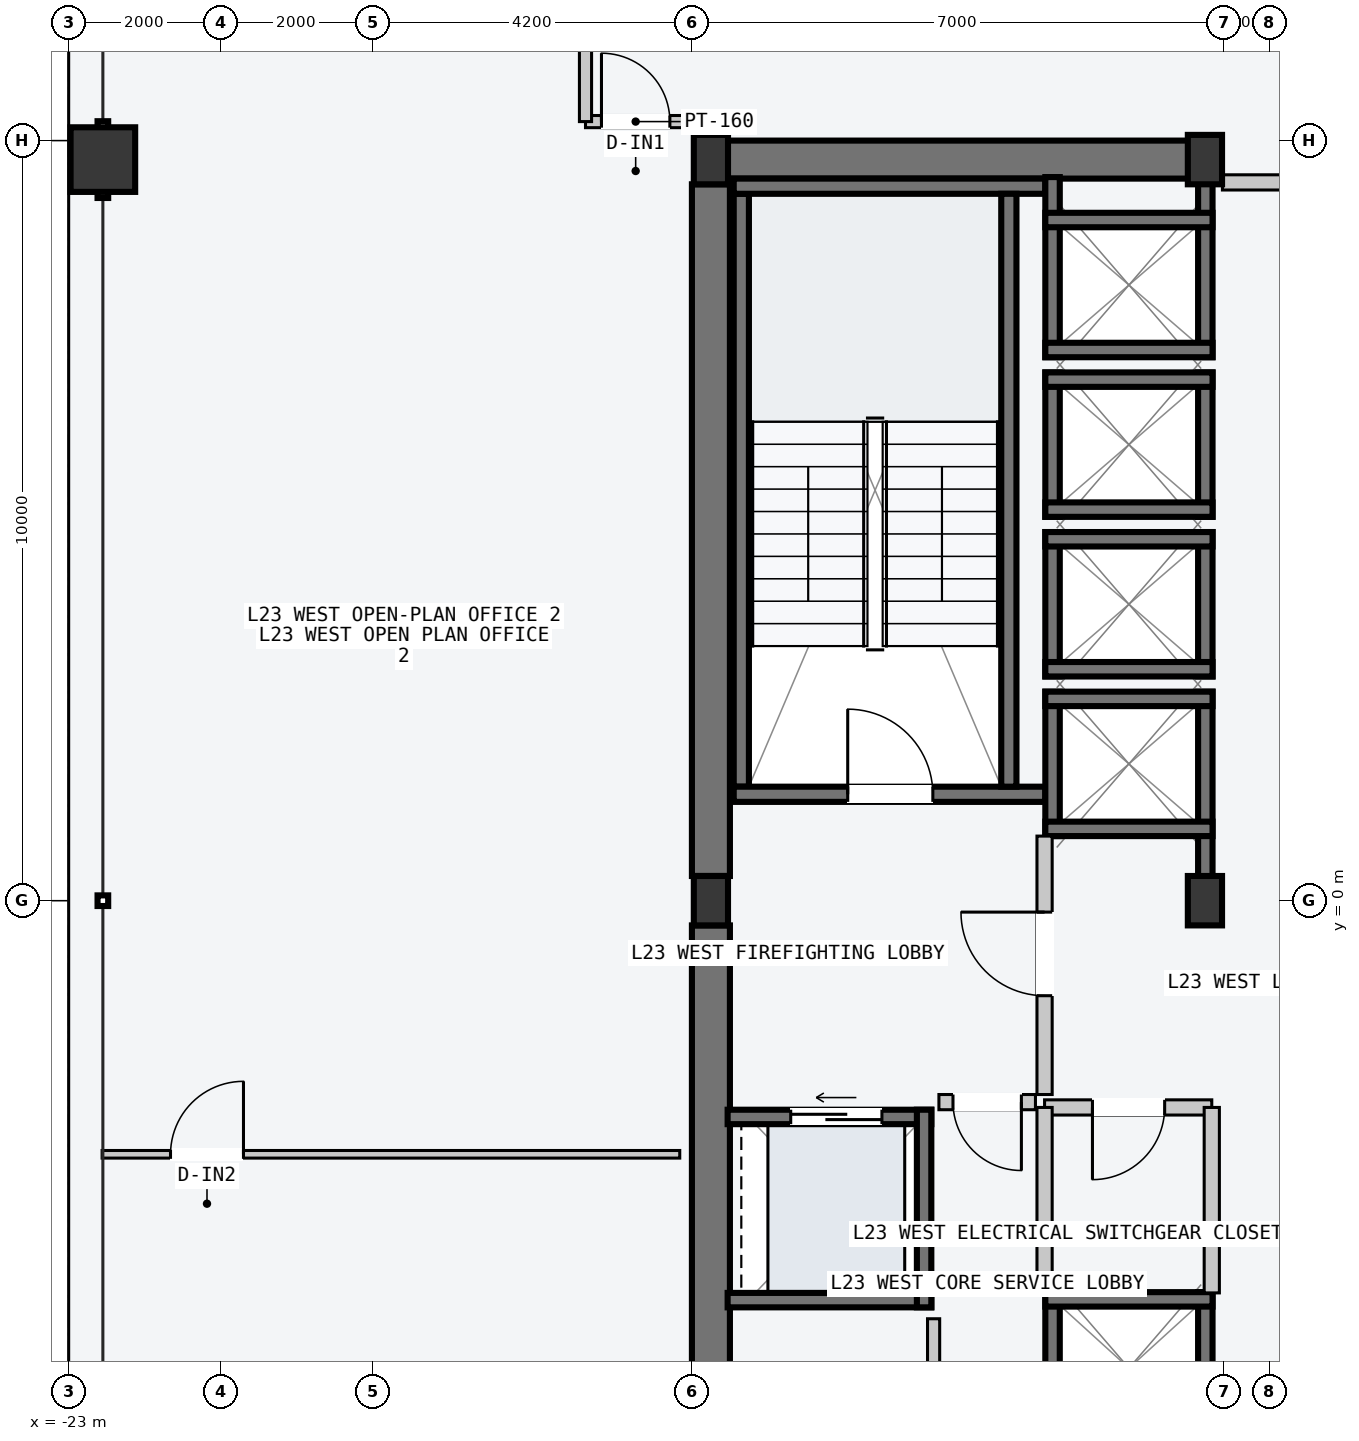
"""IFC4 building model, lengths in metres.
Left out: names, types, materials, properties, quantities, classifications, styles, units other than length and angle.
Written with IfcOpenShell. Run it as: python <this file> out.ifc"""

import sys

from ifc_helpers import new_model, si_unit, direction, frame, frame_2d, origin, origin_2d, place, context, subcontext, project, spatial, rectangle, hollow_rectangle, i_section, extrude, element, fill, save


model = new_model("IFC4")
c1 = context("Model", 3, precision=1e-05, world=origin(), true_north=direction((0.0, 1.0)))
c2 = subcontext(c1, "Body", "Model", "MODEL_VIEW")
j1 = project(units=[si_unit("LENGTHUNIT", "METRE"), si_unit("PLANEANGLEUNIT", "RADIAN")], contexts=[c1])
p1 = place(None, origin())
s1 = spatial("IfcSite", under=j1, at=p1, CompositionType="ELEMENT")
p2 = place(p1, origin())
s2 = spatial("IfcBuilding", under=s1, at=p2, CompositionType="ELEMENT")
p3 = place(p2, frame((0.0, 0.0, 91.8)))
s3 = spatial("IfcBuildingStorey", under=s2, at=p3, CompositionType="ELEMENT", Elevation=91.8)
p4 = place(p3, frame((-14.53, 9.75, -0.2), z_axis=(0.0, 0.0, 1.0), x_axis=(1.0, 0.0, 0.0)))
e1 = element("IfcWall", 1, at=p4, inside=s3, PredefinedType="SHEAR", context=c2, shape_type="SweptSolid", body=[
    extrude(rectangle(XDim=6.46, YDim=0.5, at=frame_2d((3.23, 0.0))), origin(), (0.0, 0.0, 1.0), 3.6),
])
for number, where, z_axis, x_axis in (
    (2, (-14.55, -9.425, -0.2), (0.0, 0.0, 1.0), (0.0, 1.0, 0.0)),
    (3, (-14.55, 0.325, -0.2), (0.0, 0.0, 1.0), (0.0, 1.0, 0.0)),
):
    element("IfcWall", number, at=place(p3, frame(where, z_axis=z_axis, x_axis=x_axis)), inside=s3, PredefinedType="SHEAR", context=c2, shape_type="SweptSolid", body=[
        extrude(rectangle(XDim=9.1, YDim=0.5, at=frame_2d((4.55, 0.0))), origin(), (0.0, 0.0, 1.0), 3.6),
    ])
p5 = place(p3, frame((-14.15, 1.5, -0.2), z_axis=(0.0, 0.0, 1.0), x_axis=(0.0, 1.0, 0.0)))
e4 = element("IfcWall", 4, at=p5, inside=s3, PredefinedType="SOLIDWALL", context=c2, shape_type="SweptSolid", body=[
    extrude(rectangle(XDim=7.8, YDim=0.2, at=frame_2d((3.9, 0.0))), origin(), (0.0, 0.0, 1.0), 3.6),
])
p6 = place(p3, frame((-14.25, 1.4, -0.2), z_axis=(0.0, 0.0, 1.0), x_axis=(1.0, 0.0, 0.0)))
e5 = element("IfcWall", 5, at=p6, inside=s3, PredefinedType="SOLIDWALL", context=c2, shape_type="SweptSolid", body=[
    extrude(rectangle(XDim=4.1, YDim=0.2, at=frame_2d((2.05, 0.0))), origin(), (0.0, 0.0, 1.0), 3.6),
])
p7 = place(p6, frame((1.5, 0.0, 0.2)))
e6 = element("IfcOpeningElement", 6, at=p7, cuts=e5, PredefinedType="OPENING", context=c2, shape_type="SweptSolid", body=[
    extrude(rectangle(XDim=1.12, YDim=2.18, at=frame_2d((0.56, 1.09))), frame((0.0, 0.11, 0.0), z_axis=(0.0, -1.0, 0.0), x_axis=(1.0, 0.0, 0.0)), (0.0, 0.0, 1.0), 0.22),
])
p8 = place(p3, frame((-14.25, 9.4, -0.2), z_axis=(0.0, 0.0, 1.0), x_axis=(1.0, 0.0, 0.0)))
e7 = element("IfcWall", 7, at=p8, inside=s3, PredefinedType="SOLIDWALL", context=c2, shape_type="SweptSolid", body=[
    extrude(rectangle(XDim=4.1, YDim=0.2, at=frame_2d((2.05, 0.0))), origin(), (0.0, 0.0, 1.0), 3.6),
])
p9 = place(p3, frame((-10.63, 1.5, -0.2), z_axis=(0.0, 0.0, 1.0), x_axis=(0.0, 1.0, 0.0)))
e8 = element("IfcWall", 8, at=p9, inside=s3, PredefinedType="SOLIDWALL", context=c2, shape_type="SweptSolid", body=[
    extrude(rectangle(XDim=7.8, YDim=0.2, at=frame_2d((3.9, 0.0))), origin(), (0.0, 0.0, 1.0), 3.6),
])
for number, where, z_axis, x_axis in (
    (9, (-14.55, 0.0, 0.0), (0.0, 0.0, 1.0), (1.0, 0.0, 0.0)),
    (10, (-14.55, 9.75, 0.0), (0.0, 0.0, 1.0), (1.0, 0.0, 0.0)),
    (11, (-8.05, 0.0, 0.0), (0.0, 0.0, 1.0), (1.0, 0.0, 0.0)),
    (12, (-8.05, 9.75, 0.0), (0.0, 0.0, 1.0), (1.0, 0.0, 0.0)),
):
    element("IfcColumn", number, at=place(p3, frame(where, z_axis=z_axis, x_axis=x_axis)), inside=s3, PredefinedType="COLUMN", context=c2, shape_type="SweptSolid", body=[
        extrude(i_section(OverallWidth=0.45, OverallDepth=0.65, WebThickness=0.025, FlangeThickness=0.04, at=origin_2d()), origin(), (0.0, 0.0, 1.0), 3.6),
    ])
p10 = place(p3, frame((-22.55, 9.75, 0.0), z_axis=(0.0, 0.0, 1.0), x_axis=(0.0, 1.0, 0.0)))
e13 = element("IfcColumn", 13, at=p10, inside=s3, PredefinedType="COLUMN", context=c2, shape_type="SweptSolid", body=[
    extrude(hollow_rectangle(XDim=0.85, YDim=0.85, WallThickness=0.04, at=origin_2d()), origin(), (0.0, 0.0, 1.0), 3.6),
])
p11 = place(p3, frame((-8.045, 0.21, -0.2), z_axis=(0.0, 0.0, 1.0), x_axis=(0.0, 1.0, 0.0)))
e14 = element("IfcWall", 14, at=p11, inside=s3, PredefinedType="SOLIDWALL", context=c2, shape_type="SweptSolid", body=[
    extrude(rectangle(XDim=2.54, YDim=0.19, at=frame_2d((1.27, 0.0))), origin(), (0.0, 0.0, 1.0), 3.6),
])
p12 = place(p3, frame((-10.055, 0.85, -0.2), z_axis=(0.0, 0.0, 1.0), x_axis=(0.0, 1.0, 0.0)))
e15 = element("IfcWall", 15, at=p12, inside=s3, PredefinedType="SOLIDWALL", context=c2, shape_type="SweptSolid", body=[
    extrude(rectangle(XDim=1.9, YDim=0.19, at=frame_2d((0.95, 0.0))), origin(), (0.0, 0.0, 1.0), 3.6),
])
for number, where, z_axis, x_axis in (
    (16, (-10.15, 2.655, -0.2), (0.0, 0.0, 1.0), (1.0, 0.0, 0.0)),
    (17, (-10.15, 0.945, -0.2), (0.0, 0.0, 1.0), (1.0, 0.0, 0.0)),
):
    element("IfcWall", number, at=place(p3, frame(where, z_axis=z_axis, x_axis=x_axis)), inside=s3, PredefinedType="SOLIDWALL", context=c2, shape_type="SweptSolid", body=[
        extrude(rectangle(XDim=2.2, YDim=0.19, at=frame_2d((1.1, 0.0))), origin(), (0.0, 0.0, 1.0), 3.6),
    ])
for number, where, z_axis, x_axis in (
    (18, (-8.045, 2.95, -0.2), (0.0, 0.0, 1.0), (0.0, 1.0, 0.0)),
    (19, (-10.055, 2.95, -0.2), (0.0, 0.0, 1.0), (0.0, 1.0, 0.0)),
):
    element("IfcWall", number, at=place(p3, frame(where, z_axis=z_axis, x_axis=x_axis)), inside=s3, PredefinedType="SOLIDWALL", context=c2, shape_type="SweptSolid", body=[
        extrude(rectangle(XDim=1.9, YDim=0.19, at=frame_2d((0.95, 0.0))), origin(), (0.0, 0.0, 1.0), 3.6),
    ])
for number, where, z_axis, x_axis in (
    (20, (-10.15, 4.755, -0.2), (0.0, 0.0, 1.0), (1.0, 0.0, 0.0)),
    (21, (-10.15, 3.045, -0.2), (0.0, 0.0, 1.0), (1.0, 0.0, 0.0)),
):
    element("IfcWall", number, at=place(p3, frame(where, z_axis=z_axis, x_axis=x_axis)), inside=s3, PredefinedType="SOLIDWALL", context=c2, shape_type="SweptSolid", body=[
        extrude(rectangle(XDim=2.2, YDim=0.19, at=frame_2d((1.1, 0.0))), origin(), (0.0, 0.0, 1.0), 3.6),
    ])
for number, where, z_axis, x_axis in (
    (22, (-8.045, 5.05, -0.2), (0.0, 0.0, 1.0), (0.0, 1.0, 0.0)),
    (23, (-10.055, 5.05, -0.2), (0.0, 0.0, 1.0), (0.0, 1.0, 0.0)),
):
    element("IfcWall", number, at=place(p3, frame(where, z_axis=z_axis, x_axis=x_axis)), inside=s3, PredefinedType="SOLIDWALL", context=c2, shape_type="SweptSolid", body=[
        extrude(rectangle(XDim=1.9, YDim=0.19, at=frame_2d((0.95, 0.0))), origin(), (0.0, 0.0, 1.0), 3.6),
    ])
for number, where, z_axis, x_axis in (
    (24, (-10.15, 6.855, -0.2), (0.0, 0.0, 1.0), (1.0, 0.0, 0.0)),
    (25, (-10.15, 5.145, -0.2), (0.0, 0.0, 1.0), (1.0, 0.0, 0.0)),
):
    element("IfcWall", number, at=place(p3, frame(where, z_axis=z_axis, x_axis=x_axis)), inside=s3, PredefinedType="SOLIDWALL", context=c2, shape_type="SweptSolid", body=[
        extrude(rectangle(XDim=2.2, YDim=0.19, at=frame_2d((1.1, 0.0))), origin(), (0.0, 0.0, 1.0), 3.6),
    ])
for number, where, z_axis, x_axis in (
    (26, (-8.045, 7.15, -0.2), (0.0, 0.0, 1.0), (0.0, 1.0, 0.0)),
    (27, (-10.055, 7.15, -0.2), (0.0, 0.0, 1.0), (0.0, 1.0, 0.0)),
):
    element("IfcWall", number, at=place(p3, frame(where, z_axis=z_axis, x_axis=x_axis)), inside=s3, PredefinedType="SOLIDWALL", context=c2, shape_type="SweptSolid", body=[
        extrude(rectangle(XDim=2.37, YDim=0.19, at=frame_2d((1.185, 0.0))), origin(), (0.0, 0.0, 1.0), 3.6),
    ])
for number, where, z_axis, x_axis in (
    (28, (-10.15, 8.955, -0.2), (0.0, 0.0, 1.0), (1.0, 0.0, 0.0)),
    (29, (-10.15, 7.245, -0.2), (0.0, 0.0, 1.0), (1.0, 0.0, 0.0)),
):
    element("IfcWall", number, at=place(p3, frame(where, z_axis=z_axis, x_axis=x_axis)), inside=s3, PredefinedType="SOLIDWALL", context=c2, shape_type="SweptSolid", body=[
        extrude(rectangle(XDim=2.2, YDim=0.19, at=frame_2d((1.1, 0.0))), origin(), (0.0, 0.0, 1.0), 3.6),
    ])
for number, where, z_axis, x_axis in (
    (30, (-8.045, -7.15, -0.2), (0.0, 0.0, 1.0), (0.0, 1.0, 0.0)),
    (31, (-10.055, -7.15, -0.2), (0.0, 0.0, 1.0), (0.0, 1.0, 0.0)),
):
    element("IfcWall", number, at=place(p3, frame(where, z_axis=z_axis, x_axis=x_axis)), inside=s3, PredefinedType="SOLIDWALL", context=c2, shape_type="SweptSolid", body=[
        extrude(rectangle(XDim=2.0, YDim=0.19, at=frame_2d((1.0, 0.0))), origin(), (0.0, 0.0, 1.0), 3.6),
    ])
p13 = place(p3, frame((-10.15, -5.245, -0.2), z_axis=(0.0, 0.0, 1.0), x_axis=(1.0, 0.0, 0.0)))
e32 = element("IfcWall", 32, at=p13, inside=s3, PredefinedType="SOLIDWALL", context=c2, shape_type="SweptSolid", body=[
    extrude(rectangle(XDim=2.2, YDim=0.19, at=frame_2d((1.1, 0.0))), origin(), (0.0, 0.0, 1.0), 3.6),
])
p14 = place(p3, frame((-14.33, -2.845, -0.2), z_axis=(0.0, 0.0, 1.0), x_axis=(1.0, 0.0, 0.0)))
e33 = element("IfcWall", 33, at=p14, inside=s3, PredefinedType="SOLIDWALL", context=c2, shape_type="SweptSolid", body=[
    extrude(rectangle(XDim=2.68, YDim=0.19, at=frame_2d((1.34, 0.0))), origin(), (0.0, 0.0, 1.0), 3.6),
])
p15 = place(p14, frame((0.83, 0.0, 0.2)))
e34 = element("IfcOpeningElement", 34, at=p15, cuts=e33, PredefinedType="OPENING", context=c2, shape_type="SweptSolid", body=[
    extrude(rectangle(XDim=1.2, YDim=2.2, at=frame_2d((0.6, 1.1))), frame((0.0, 0.105, 0.0), z_axis=(0.0, -1.0, 0.0), x_axis=(1.0, 0.0, 0.0)), (0.0, 0.0, 1.0), 0.21),
])
p16 = place(p3, frame((-14.33, -5.255, -0.2), z_axis=(0.0, 0.0, 1.0), x_axis=(1.0, 0.0, 0.0)))
e35 = element("IfcWall", 35, at=p16, inside=s3, PredefinedType="SOLIDWALL", context=c2, shape_type="SweptSolid", body=[
    extrude(rectangle(XDim=2.68, YDim=0.19, at=frame_2d((1.34, 0.0))), origin(), (0.0, 0.0, 1.0), 3.6),
])
p17 = place(p3, frame((-11.745, -5.35, -0.2), z_axis=(0.0, 0.0, 1.0), x_axis=(0.0, 1.0, 0.0)))
e36 = element("IfcWall", 36, at=p17, inside=s3, PredefinedType="SOLIDWALL", context=c2, shape_type="SweptSolid", body=[
    extrude(rectangle(XDim=2.6, YDim=0.19, at=frame_2d((1.3, 0.0))), origin(), (0.0, 0.0, 1.0), 3.6),
])
p18 = place(p3, frame((-6.02, 9.45, 0.0), z_axis=(0.0, 0.0, 1.0), x_axis=(-1.0, 0.0, 0.0)))
e37 = element("IfcWall", 37, at=p18, inside=s3, PredefinedType="PARTITIONING", context=c2, shape_type="SweptSolid", body=[
    extrude(rectangle(XDim=1.8, YDim=0.2, at=frame_2d((0.9, 0.0))), origin(), (0.0, 0.0, 1.0), 3.4),
])
p19 = place(p3, frame((-10.16, -2.55, 0.0), z_axis=(0.0, 0.0, 1.0), x_axis=(0.0, 1.0, 0.0)))
e38 = element("IfcWall", 38, at=p19, inside=s3, PredefinedType="PARTITIONING", context=c2, shape_type="SweptSolid", body=[
    extrude(rectangle(XDim=3.4, YDim=0.2, at=frame_2d((1.7, 0.0))), origin(), (0.0, 0.0, 1.0), 3.4),
])
p20 = place(p19, frame((1.3, 0.0, 0.0)))
e39 = element("IfcOpeningElement", 39, at=p20, cuts=e38, PredefinedType="OPENING", context=c2, shape_type="SweptSolid", body=[
    extrude(rectangle(XDim=1.1, YDim=2.15, at=frame_2d((0.55, 1.075))), frame((0.0, 0.11, 0.0), z_axis=(0.0, -1.0, 0.0), x_axis=(1.0, 0.0, 0.0)), (0.0, 0.0, 1.0), 0.22),
])
p21 = place(p3, frame((-10.28, -2.65, 0.0), z_axis=(0.0, 0.0, 1.0), x_axis=(-1.0, 0.0, 0.0)))
e40 = element("IfcWall", 40, at=p21, inside=s3, PredefinedType="PARTITIONING", context=c2, shape_type="SweptSolid", body=[
    extrude(rectangle(XDim=1.27, YDim=0.2, at=frame_2d((0.635, 0.0))), origin(), (0.0, 0.0, 1.0), 3.4),
])
p22 = place(p21, frame((0.185, 0.0, 0.0)))
e41 = element("IfcOpeningElement", 41, at=p22, cuts=e40, PredefinedType="OPENING", context=c2, shape_type="SweptSolid", body=[
    extrude(rectangle(XDim=0.9, YDim=2.15, at=frame_2d((0.45, 1.075))), frame((0.0, 0.11, 0.0), z_axis=(0.0, -1.0, 0.0), x_axis=(1.0, 0.0, 0.0)), (0.0, 0.0, 1.0), 0.22),
])
p23 = place(p3, frame((-7.96, -2.72, 0.0), z_axis=(0.0, 0.0, 1.0), x_axis=(-1.0, 0.0, 0.0)))
e42 = element("IfcWall", 42, at=p23, inside=s3, PredefinedType="PARTITIONING", context=c2, shape_type="SweptSolid", body=[
    extrude(rectangle(XDim=2.2, YDim=0.2, at=frame_2d((1.1, 0.0))), origin(), (0.0, 0.0, 1.0), 3.4),
])
p24 = place(p23, frame((0.62, 0.0, 0.0)))
e43 = element("IfcOpeningElement", 43, at=p24, cuts=e42, PredefinedType="OPENING", context=c2, shape_type="SweptSolid", body=[
    extrude(rectangle(XDim=0.95, YDim=2.1, at=frame_2d((0.475, 1.05))), frame((0.0, 0.11, 0.0), z_axis=(0.0, -1.0, 0.0), x_axis=(1.0, 0.0, 0.0)), (0.0, 0.0, 1.0), 0.22),
])
for number, where, z_axis, x_axis in (
    (44, (-7.96, -5.16, 0.0), (0.0, 0.0, 1.0), (0.0, 1.0, 0.0)),
    (45, (-10.16, -5.16, 0.0), (0.0, 0.0, 1.0), (0.0, 1.0, 0.0)),
):
    element("IfcWall", number, at=place(p3, frame(where, z_axis=z_axis, x_axis=x_axis)), inside=s3, PredefinedType="PARTITIONING", context=c2, shape_type="SweptSolid", body=[
        extrude(rectangle(XDim=2.44, YDim=0.2, at=frame_2d((1.22, 0.0))), origin(), (0.0, 0.0, 1.0), 3.4),
    ])
p25 = place(p3, frame((-11.62, -9.35, 0.0), z_axis=(0.0, 0.0, 1.0), x_axis=(0.0, 1.0, 0.0)))
e46 = element("IfcWall", 46, at=p25, inside=s3, PredefinedType="PARTITIONING", context=c2, shape_type="SweptSolid", body=[
    extrude(rectangle(XDim=3.85, YDim=0.16, at=frame_2d((1.925, 0.0))), origin(), (0.0, 0.0, 1.0), 3.4),
])
p26 = place(p25, frame((1.475, 0.0, 0.0)))
e47 = element("IfcOpeningElement", 47, at=p26, cuts=e46, PredefinedType="OPENING", context=c2, shape_type="SweptSolid", body=[
    extrude(rectangle(XDim=0.9, YDim=2.15, at=frame_2d((0.45, 1.075))), frame((0.0, 0.09, 0.0), z_axis=(0.0, -1.0, 0.0), x_axis=(1.0, 0.0, 0.0)), (0.0, 0.0, 1.0), 0.18),
])
p27 = place(p3, frame((-16.2, 10.25, 0.0), z_axis=(0.0, 0.0, 1.0), x_axis=(1.0, 0.0, 0.0)))
e48 = element("IfcWall", 48, at=p27, inside=s3, PredefinedType="PARTITIONING", context=c2, shape_type="SweptSolid", body=[
    extrude(rectangle(XDim=1.32, YDim=0.16, at=frame_2d((0.66, 0.0))), origin(), (0.0, 0.0, 1.0), 3.4),
])
p28 = place(p27, frame((0.21, 0.0, 0.0)))
e49 = element("IfcOpeningElement", 49, at=p28, cuts=e48, PredefinedType="OPENING", context=c2, shape_type="SweptSolid", body=[
    extrude(rectangle(XDim=0.9, YDim=2.15, at=frame_2d((0.45, 1.075))), frame((0.0, 0.09, 0.0), z_axis=(0.0, -1.0, 0.0), x_axis=(1.0, 0.0, 0.0)), (0.0, 0.0, 1.0), 0.18),
])
p29 = place(p3, frame((-16.2, 10.25, 0.0), z_axis=(0.0, 0.0, 1.0), x_axis=(0.0, 1.0, 0.0)))
e50 = element("IfcWall", 50, at=p29, inside=s3, PredefinedType="PARTITIONING", context=c2, shape_type="SweptSolid", body=[
    extrude(rectangle(XDim=1.95, YDim=0.16, at=frame_2d((0.975, 0.0))), origin(), (0.0, 0.0, 1.0), 3.4),
])
p30 = place(p3, frame((-22.56, -3.336, 0.0), z_axis=(0.0, 0.0, 1.0), x_axis=(1.0, 0.0, 0.0)))
e51 = element("IfcWall", 51, at=p30, inside=s3, PredefinedType="PARTITIONING", context=c2, shape_type="SweptSolid", body=[
    extrude(rectangle(XDim=7.6, YDim=0.1, at=frame_2d((3.8, 0.0))), origin(), (0.0, 0.0, 1.0), 2.95),
])
p31 = place(p30, frame((0.9, 0.0, 0.0)))
e52 = element("IfcOpeningElement", 52, at=p31, cuts=e51, PredefinedType="OPENING", context=c2, shape_type="SweptSolid", body=[
    extrude(rectangle(XDim=0.96, YDim=2.18, at=frame_2d((0.48, 1.09))), frame((0.0, 0.06, 0.0), z_axis=(0.0, -1.0, 0.0), x_axis=(1.0, 0.0, 0.0)), (0.0, 0.0, 1.0), 0.12),
])
p32 = place(p7, origin())
e53 = element("IfcDoor", 53, at=p32, inside=s3, OperationType="SINGLE_SWING_LEFT", PredefinedType="DOOR", context=c2, shape_type="SweptSolid", body=[
    extrude(rectangle(XDim=1.12, YDim=2.18, at=frame_2d((0.56, 1.09))), frame((0.0, 0.025, 0.0), z_axis=(0.0, -1.0, 0.0), x_axis=(1.0, 0.0, 0.0)), (0.0, 0.0, 1.0), 0.05),
])
fill(e6, e53)
p33 = place(p15, origin())
e54 = element("IfcDoor", 54, at=p33, inside=s3, OperationType="SLIDING_TO_LEFT", PredefinedType="DOOR", context=c2, shape_type="SweptSolid", body=[
    extrude(rectangle(XDim=1.2, YDim=2.2, at=frame_2d((0.6, 1.1))), frame((0.0, 0.025, 0.0), z_axis=(0.0, -1.0, 0.0), x_axis=(1.0, 0.0, 0.0)), (0.0, 0.0, 1.0), 0.05),
])
fill(e34, e54)
p34 = place(p20, origin())
e55 = element("IfcDoor", 55, at=p34, inside=s3, OperationType="SINGLE_SWING_RIGHT", PredefinedType="DOOR", context=c2, shape_type="SweptSolid", body=[
    extrude(rectangle(XDim=1.1, YDim=2.15, at=frame_2d((0.55, 1.075))), frame((0.0, 0.025, 0.0), z_axis=(0.0, -1.0, 0.0), x_axis=(1.0, 0.0, 0.0)), (0.0, 0.0, 1.0), 0.05),
])
fill(e39, e55)
p35 = place(p22, origin())
e56 = element("IfcDoor", 56, at=p35, inside=s3, OperationType="SINGLE_SWING_LEFT", PredefinedType="DOOR", context=c2, shape_type="SweptSolid", body=[
    extrude(rectangle(XDim=0.9, YDim=2.15, at=frame_2d((0.45, 1.075))), frame((0.0, 0.025, 0.0), z_axis=(0.0, -1.0, 0.0), x_axis=(1.0, 0.0, 0.0)), (0.0, 0.0, 1.0), 0.05),
])
fill(e41, e56)
p36 = place(p24, origin())
e57 = element("IfcDoor", 57, at=p36, inside=s3, OperationType="SINGLE_SWING_RIGHT", PredefinedType="DOOR", context=c2, shape_type="SweptSolid", body=[
    extrude(rectangle(XDim=0.95, YDim=2.1, at=frame_2d((0.475, 1.05))), frame((0.0, 0.025, 0.0), z_axis=(0.0, -1.0, 0.0), x_axis=(1.0, 0.0, 0.0)), (0.0, 0.0, 1.0), 0.05),
])
fill(e43, e57)
p37 = place(p28, origin())
e58 = element("IfcDoor", 58, at=p37, inside=s3, OperationType="SINGLE_SWING_LEFT", PredefinedType="DOOR", context=c2, shape_type="SweptSolid", body=[
    extrude(rectangle(XDim=0.9, YDim=2.15, at=frame_2d((0.45, 1.075))), frame((0.0, 0.025, 0.0), z_axis=(0.0, -1.0, 0.0), x_axis=(1.0, 0.0, 0.0)), (0.0, 0.0, 1.0), 0.05),
])
fill(e49, e58)
p38 = place(p31, origin())
e59 = element("IfcDoor", 59, at=p38, inside=s3, OperationType="SINGLE_SWING_RIGHT", PredefinedType="DOOR", context=c2, shape_type="SweptSolid", body=[
    extrude(rectangle(XDim=0.96, YDim=2.18, at=frame_2d((0.48, 1.09))), frame((0.0, 0.025, 0.0), z_axis=(0.0, -1.0, 0.0), x_axis=(1.0, 0.0, 0.0)), (0.0, 0.0, 1.0), 0.05),
])
fill(e52, e59)
save(model, sys.argv[1])
